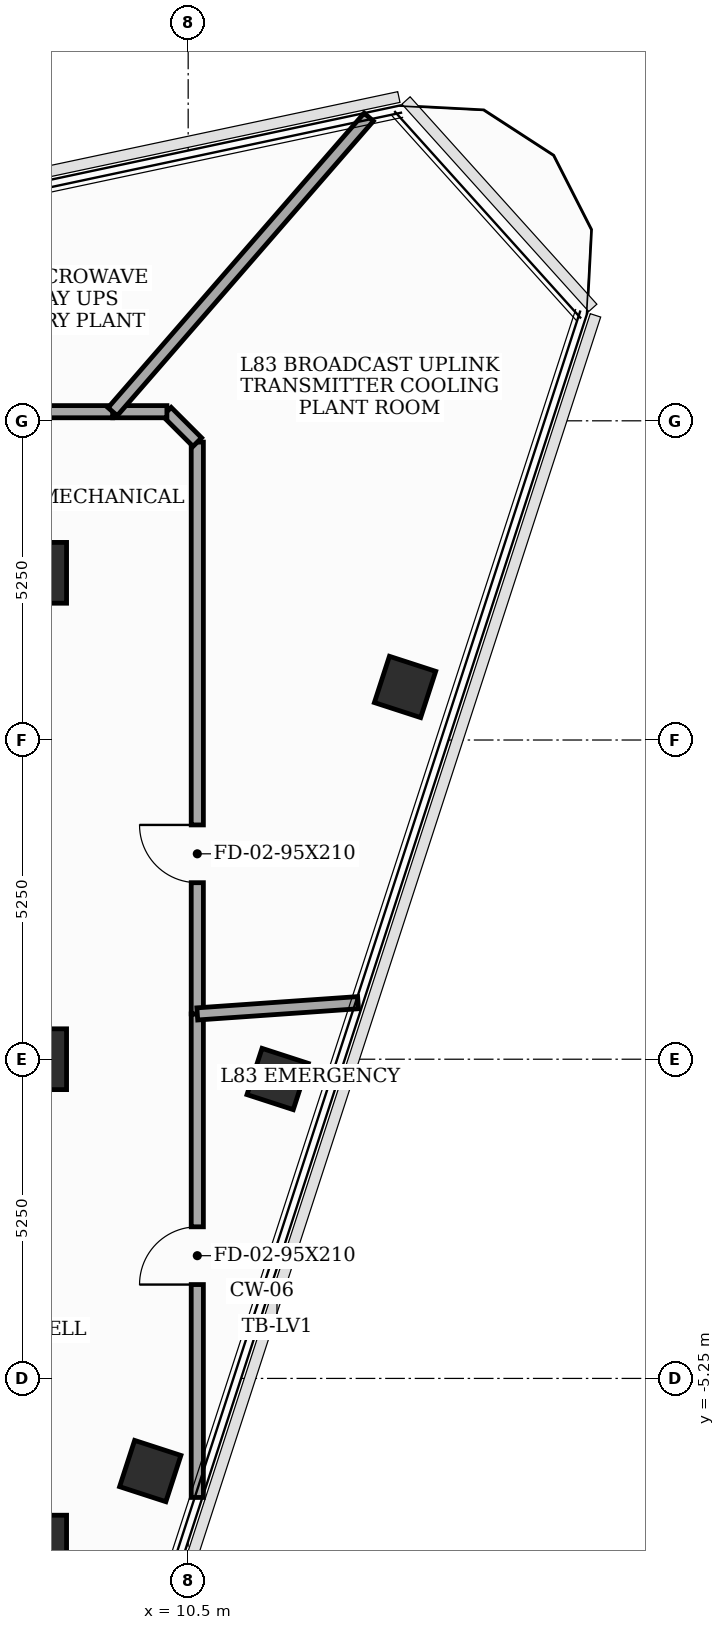
"""IFC4 building model, lengths in metres.
Left out: names, types, materials, properties, quantities, classifications, styles, units other than length and angle.
Written with IfcOpenShell. Run it as: python <this file> out.ifc"""

import sys

from ifc_helpers import new_model, si_unit, direction, frame, frame_2d, origin, origin_2d, place, context, subcontext, project, spatial, rectangle, extrude, element, fill, save


model = new_model("IFC4")
c1 = context("Model", 3, precision=1e-05, world=origin(), true_north=direction((0.0, 1.0)))
c2 = subcontext(c1, "Body", "Model", "MODEL_VIEW")
j1 = project(units=[si_unit("LENGTHUNIT", "METRE"), si_unit("PLANEANGLEUNIT", "RADIAN")], contexts=[c1])
p1 = place(None, origin())
s1 = spatial("IfcSite", under=j1, at=p1, CompositionType="ELEMENT")
p2 = place(p1, origin())
s2 = spatial("IfcBuilding", under=s1, at=p2, CompositionType="ELEMENT")
p3 = place(p2, frame((0.0, 0.0, 322.0)))
s3 = spatial("IfcBuildingStorey", under=s2, at=p3, CompositionType="ELEMENT", Elevation=322.0)
for number, where, z_axis, x_axis in (
    (1, (8.0, -8.0, 0.0), (0.0, 0.0, 1.0), (1.0, 0.0, 0.0)),
    (2, (8.0, 0.0, 0.0), (0.0, 0.0, 1.0), (1.0, 0.0, 0.0)),
    (3, (8.0, 8.0, 0.0), (0.0, 0.0, 1.0), (1.0, 0.0, 0.0)),
):
    element("IfcColumn", number, at=place(p3, frame(where, z_axis=z_axis, x_axis=x_axis)), inside=s3, PredefinedType="COLUMN", context=c2, shape_type="SweptSolid", body=[
        extrude(rectangle(XDim=1.0, YDim=1.0, at=origin_2d()), origin(), (0.0, 0.0, 1.0), 4.6),
    ])
for number, where, z_axis, x_axis in (
    (4, (9.876, -6.773, 0.0), (0.0, 0.0, 1.0), (0.309, 0.951, 0.0)),
    (5, (11.971, -0.325, 0.0), (0.0, 0.0, 1.0), (0.309, 0.951, 0.0)),
    (6, (14.067, 6.123, 0.0), (0.0, 0.0, 1.0), (0.309, 0.951, 0.0)),
):
    element("IfcColumn", number, at=place(p3, frame(where, z_axis=z_axis, x_axis=x_axis)), inside=s3, PredefinedType="COLUMN", context=c2, shape_type="SweptSolid", body=[
        extrude(rectangle(XDim=0.8, YDim=0.8, at=origin_2d()), origin(), (0.0, 0.0, 1.0), 4.6),
    ])
p4 = place(p3, frame((10.65, -7.208, 0.0), z_axis=(0.0, 0.0, 1.0), x_axis=(0.0, 1.0, 0.0)))
e7 = element("IfcWall", 7, at=p4, inside=s3, PredefinedType="SOLIDWALL", context=c2, shape_type="SweptSolid", body=[
    extrude(rectangle(XDim=7.953, YDim=0.2, at=frame_2d((3.977, 0.0))), origin(), (0.0, 0.0, 1.0), 2.965),
])
p5 = place(p4, frame((3.501, 0.0, 0.0)))
e8 = element("IfcOpeningElement", 8, at=p5, cuts=e7, PredefinedType="OPENING", context=c2, shape_type="SweptSolid", body=[
    extrude(rectangle(XDim=0.95, YDim=2.1, at=frame_2d((0.475, 1.05))), frame((0.0, 0.11, 0.0), z_axis=(0.0, -1.0, 0.0), x_axis=(1.0, 0.0, 0.0)), (0.0, 0.0, 1.0), 0.22),
])
p6 = place(p3, frame((10.65, 0.745, 0.0), z_axis=(0.0, 0.0, 1.0), x_axis=(0.0, 1.0, 0.0)))
e9 = element("IfcWall", 9, at=p6, inside=s3, PredefinedType="SOLIDWALL", context=c2, shape_type="SweptSolid", body=[
    extrude(rectangle(XDim=9.405, YDim=0.2, at=frame_2d((4.702, 0.0))), origin(), (0.0, 0.0, 1.0), 2.965),
])
p7 = place(p6, frame((2.158, 0.0, 0.0)))
e10 = element("IfcOpeningElement", 10, at=p7, cuts=e9, PredefinedType="OPENING", context=c2, shape_type="SweptSolid", body=[
    extrude(rectangle(XDim=0.95, YDim=2.1, at=frame_2d((0.475, 1.05))), frame((0.0, 0.11, 0.0), z_axis=(0.0, -1.0, 0.0), x_axis=(1.0, 0.0, 0.0)), (0.0, 0.0, 1.0), 0.22),
])
p8 = place(p3, frame((10.65, 10.15, 0.0), z_axis=(0.0, 0.0, 1.0), x_axis=(-0.707106781187, 0.707106781187, 0.0)))
e11 = element("IfcWall", 11, at=p8, inside=s3, PredefinedType="SOLIDWALL", context=c2, shape_type="SweptSolid", body=[
    extrude(rectangle(XDim=0.707, YDim=0.2, at=frame_2d((0.354, 0.0))), origin(), (0.0, 0.0, 1.0), 2.965),
])
p9 = place(p3, frame((10.15, 10.65, 0.0), z_axis=(0.0, 0.0, 1.0), x_axis=(-1.0, 0.0, 0.0)))
e12 = element("IfcWall", 12, at=p9, inside=s3, PredefinedType="SOLIDWALL", context=c2, shape_type="SweptSolid", body=[
    extrude(rectangle(XDim=0.892, YDim=0.2, at=frame_2d((0.446, 0.0))), origin(), (0.0, 0.0, 1.0), 2.965),
])
p10 = place(p3, frame((9.258, 10.65, 0.0), z_axis=(0.0, 0.0, 1.0), x_axis=(-1.0, 0.0, 0.0)))
e13 = element("IfcWall", 13, at=p10, inside=s3, PredefinedType="SOLIDWALL", context=c2, shape_type="SweptSolid", body=[
    extrude(rectangle(XDim=10.003, YDim=0.2, at=frame_2d((5.001, 0.0))), origin(), (0.0, 0.0, 1.0), 2.965),
])
p11 = place(p10, frame((5.127, 0.0, 0.0)))
e14 = element("IfcOpeningElement", 14, at=p11, cuts=e13, PredefinedType="OPENING", context=c2, shape_type="SweptSolid", body=[
    extrude(rectangle(XDim=0.95, YDim=2.1, at=frame_2d((0.475, 1.05))), frame((0.0, 0.11, 0.0), z_axis=(0.0, -1.0, 0.0), x_axis=(1.0, 0.0, 0.0)), (0.0, 0.0, 1.0), 0.22),
])
p12 = place(p3, frame((13.294, 0.93, 0.0), z_axis=(0.0, 0.0, 1.0), x_axis=(-0.997566467823, -0.069721892359, 0.0)))
e15 = element("IfcWall", 15, at=p12, inside=s3, PredefinedType="SOLIDWALL", context=c2, shape_type="SweptSolid", body=[
    extrude(rectangle(XDim=2.651, YDim=0.2, at=frame_2d((1.325, 0.0))), origin(), (0.0, 0.0, 1.0), 2.965),
])
p13 = place(p3, frame((13.469, 15.495, 0.0), z_axis=(0.0, 0.0, 1.0), x_axis=(-0.656018638206, -0.754744689498, 0.0)))
e16 = element("IfcWall", 16, at=p13, inside=s3, PredefinedType="SOLIDWALL", context=c2, shape_type="SweptSolid", body=[
    extrude(rectangle(XDim=6.42, YDim=0.2, at=frame_2d((3.21, 0.0))), origin(), (0.0, 0.0, 1.0), 2.965),
])
p14 = place(p5, origin())
e17 = element("IfcDoor", 17, at=p14, inside=s3, OperationType="SINGLE_SWING_LEFT", PredefinedType="DOOR", context=c2, shape_type="SweptSolid", body=[
    extrude(rectangle(XDim=0.95, YDim=2.1, at=frame_2d((0.475, 1.05))), frame((0.0, 0.025, 0.0), z_axis=(0.0, -1.0, 0.0), x_axis=(1.0, 0.0, 0.0)), (0.0, 0.0, 1.0), 0.05),
])
fill(e8, e17)
p15 = place(p7, origin())
e18 = element("IfcDoor", 18, at=p15, inside=s3, OperationType="SINGLE_SWING_RIGHT", PredefinedType="DOOR", context=c2, shape_type="SweptSolid", body=[
    extrude(rectangle(XDim=0.95, YDim=2.1, at=frame_2d((0.475, 1.05))), frame((0.0, 0.025, 0.0), z_axis=(0.0, -1.0, 0.0), x_axis=(1.0, 0.0, 0.0)), (0.0, 0.0, 1.0), 0.05),
])
fill(e10, e18)
save(model, sys.argv[1])
